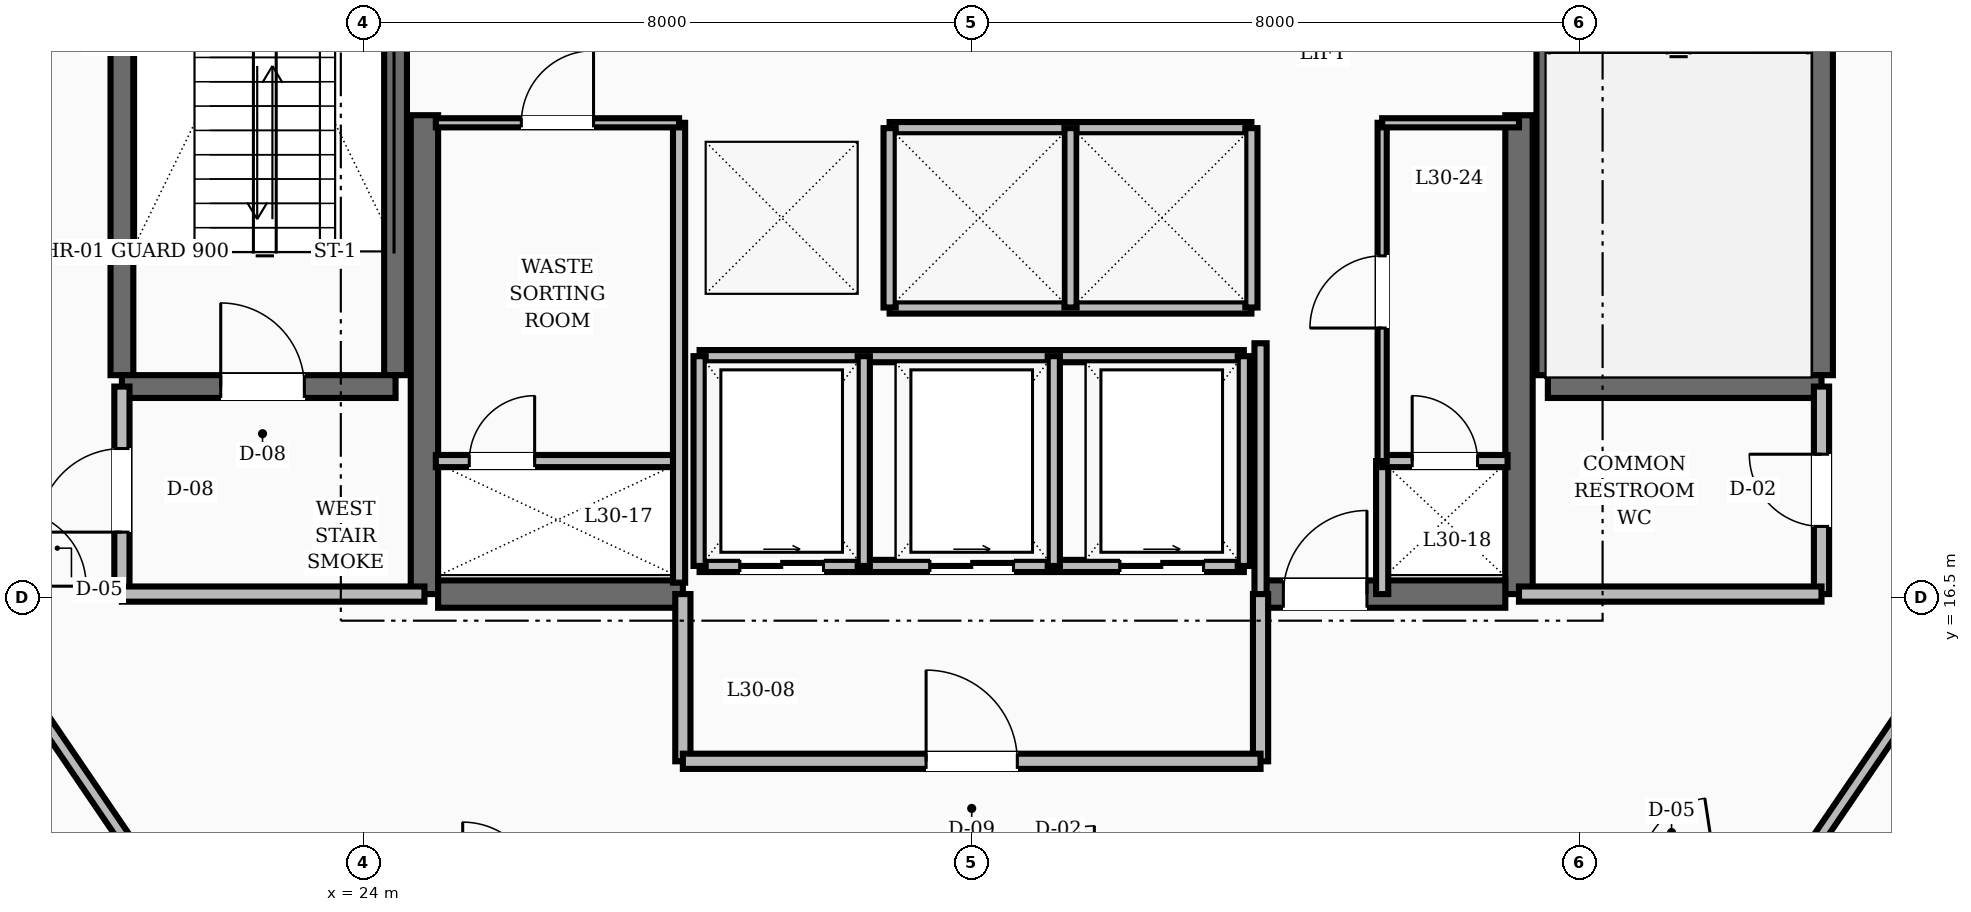
"""IFC4 building model, lengths in metres.
Left out: names, types, materials, properties, quantities, classifications, styles, units other than length and angle.
Written with IfcOpenShell. Run it as: python <this file> out.ifc"""

import sys

from ifc_helpers import new_model, si_unit, direction, frame, frame_2d, origin, place, context, subcontext, project, spatial, rectangle, extrude, element, fill, save


model = new_model("IFC4")
c1 = context("Model", 3, precision=1e-05, world=origin(), true_north=direction((0.0, 1.0)))
c2 = subcontext(c1, "Body", "Model", "MODEL_VIEW")
j1 = project(units=[si_unit("LENGTHUNIT", "METRE"), si_unit("PLANEANGLEUNIT", "RADIAN")], contexts=[c1])
p1 = place(None, origin())
s1 = spatial("IfcSite", under=j1, at=p1, CompositionType="ELEMENT")
p2 = place(p1, origin())
s2 = spatial("IfcBuilding", under=s1, at=p2, CompositionType="ELEMENT")
p3 = place(p2, frame((0.0, 0.0, 120.8)))
s3 = spatial("IfcBuildingStorey", under=s2, at=p3, CompositionType="ELEMENT", Elevation=120.8)
for number, where, z_axis, x_axis in (
    (1, (24.8, 16.55, 0.0), (0.0, 0.0, 1.0), (0.0, 1.0, 0.0)),
    (2, (39.2, 16.55, 0.0), (0.0, 0.0, 1.0), (0.0, 1.0, 0.0)),
):
    element("IfcWall", number, at=place(p3, frame(where, z_axis=z_axis, x_axis=x_axis)), inside=s3, PredefinedType="SHEAR", context=c2, shape_type="SweptSolid", body=[
        extrude(rectangle(XDim=6.3, YDim=0.36, at=frame_2d((3.15, 0.0))), origin(), (0.0, 0.0, 1.0), 3.6),
    ])
p4 = place(p3, frame((24.98, 16.55, 0.0), z_axis=(0.0, 0.0, 1.0), x_axis=(1.0, 0.0, 0.0)))
e3 = element("IfcWall", 3, at=p4, inside=s3, PredefinedType="SHEAR", context=c2, shape_type="SweptSolid", body=[
    extrude(rectangle(XDim=3.22, YDim=0.36, at=frame_2d((1.61, 0.0))), origin(), (0.0, 0.0, 1.0), 3.6),
])
p5 = place(p3, frame((35.8, 16.55, 0.0), z_axis=(0.0, 0.0, 1.0), x_axis=(1.0, 0.0, 0.0)))
e4 = element("IfcWall", 4, at=p5, inside=s3, PredefinedType="SHEAR", context=c2, shape_type="SweptSolid", body=[
    extrude(rectangle(XDim=3.22, YDim=0.36, at=frame_2d((1.61, 0.0))), origin(), (0.0, 0.0, 1.0), 3.6),
])
p6 = place(p5, frame((0.3, 0.0, 0.0)))
e5 = element("IfcOpeningElement", 5, at=p6, cuts=e4, PredefinedType="OPENING", context=c2, shape_type="SweptSolid", body=[
    extrude(rectangle(XDim=1.1, YDim=2.1, at=frame_2d((0.55, 1.05))), frame((0.0, 0.19, 0.0), z_axis=(0.0, -1.0, 0.0), x_axis=(1.0, 0.0, 0.0)), (0.0, 0.0, 1.0), 0.38),
])
for number, where, z_axis, x_axis in (
    (6, (20.82, 19.43, 0.0), (0.0, 0.0, 1.0), (0.0, 1.0, 0.0)),
    (7, (24.42, 19.43, 0.0), (0.0, 0.0, 1.0), (0.0, 1.0, 0.0)),
):
    element("IfcWall", number, at=place(p3, frame(where, z_axis=z_axis, x_axis=x_axis)), inside=s3, PredefinedType="SHEAR", context=c2, shape_type="SweptSolid", body=[
        extrude(rectangle(XDim=8.74, YDim=0.3, at=frame_2d((4.37, 0.0))), origin(), (0.0, 0.0, 1.0), 3.6),
    ])
p7 = place(p3, frame((20.82, 19.28, 0.0), z_axis=(0.0, 0.0, 1.0), x_axis=(1.0, 0.0, 0.0)))
e8 = element("IfcWall", 8, at=p7, inside=s3, PredefinedType="SHEAR", context=c2, shape_type="SweptSolid", body=[
    extrude(rectangle(XDim=3.6, YDim=0.3, at=frame_2d((1.8, 0.0))), origin(), (0.0, 0.0, 1.0), 3.6),
])
p8 = place(p7, frame((1.3, 0.0, 0.0)))
e9 = element("IfcOpeningElement", 9, at=p8, cuts=e8, PredefinedType="OPENING", context=c2, shape_type="SweptSolid", body=[
    extrude(rectangle(XDim=1.1, YDim=2.1, at=frame_2d((0.55, 1.05))), frame((0.0, 0.16, 0.0), z_axis=(0.0, -1.0, 0.0), x_axis=(1.0, 0.0, 0.0)), (0.0, 0.0, 1.0), 0.32),
])
for number, where, z_axis, x_axis in (
    (10, (43.18, 19.43, 0.0), (0.0, 0.0, 1.0), (0.0, 1.0, 0.0)),
    (11, (39.58, 19.43, 0.0), (0.0, 0.0, 1.0), (0.0, 1.0, 0.0)),
):
    element("IfcWall", number, at=place(p3, frame(where, z_axis=z_axis, x_axis=x_axis)), inside=s3, PredefinedType="SHEAR", context=c2, shape_type="SweptSolid", body=[
        extrude(rectangle(XDim=8.74, YDim=0.3, at=frame_2d((4.37, 0.0))), origin(), (0.0, 0.0, 1.0), 3.6),
    ])
p9 = place(p3, frame((39.58, 19.28, 0.0), z_axis=(0.0, 0.0, 1.0), x_axis=(1.0, 0.0, 0.0)))
e12 = element("IfcWall", 12, at=p9, inside=s3, PredefinedType="SHEAR", context=c2, shape_type="SweptSolid", body=[
    extrude(rectangle(XDim=3.6, YDim=0.3, at=frame_2d((1.8, 0.0))), origin(), (0.0, 0.0, 1.0), 3.6),
])
p10 = place(p3, frame((20.82, 16.55, 0.0), z_axis=(0.0, 0.0, 1.0), x_axis=(0.0, 1.0, 0.0)))
e13 = element("IfcWall", 13, at=p10, inside=s3, PredefinedType="SOLIDWALL", context=c2, shape_type="SweptSolid", body=[
    extrude(rectangle(XDim=2.73, YDim=0.2, at=frame_2d((1.365, 0.0))), origin(), (0.0, 0.0, 1.0), 2.8),
])
p11 = place(p10, frame((0.815, 0.0, 0.0)))
e14 = element("IfcOpeningElement", 14, at=p11, cuts=e13, PredefinedType="OPENING", context=c2, shape_type="SweptSolid", body=[
    extrude(rectangle(XDim=1.1, YDim=2.1, at=frame_2d((0.55, 1.05))), frame((0.0, 0.11, 0.0), z_axis=(0.0, -1.0, 0.0), x_axis=(1.0, 0.0, 0.0)), (0.0, 0.0, 1.0), 0.22),
])
p12 = place(p3, frame((20.82, 16.55, 0.0), z_axis=(0.0, 0.0, 1.0), x_axis=(1.0, 0.0, 0.0)))
e15 = element("IfcWall", 15, at=p12, inside=s3, PredefinedType="SOLIDWALL", context=c2, shape_type="SweptSolid", body=[
    extrude(rectangle(XDim=3.98, YDim=0.2, at=frame_2d((1.99, 0.0))), origin(), (0.0, 0.0, 1.0), 2.8),
])
p13 = place(p3, frame((43.18, 16.55, 0.0), z_axis=(0.0, 0.0, 1.0), x_axis=(0.0, 1.0, 0.0)))
e16 = element("IfcWall", 16, at=p13, inside=s3, PredefinedType="SOLIDWALL", context=c2, shape_type="SweptSolid", body=[
    extrude(rectangle(XDim=2.73, YDim=0.2, at=frame_2d((1.365, 0.0))), origin(), (0.0, 0.0, 1.0), 2.8),
])
p14 = place(p13, frame((0.89, 0.0, 0.0)))
e17 = element("IfcOpeningElement", 17, at=p14, cuts=e16, PredefinedType="OPENING", context=c2, shape_type="SweptSolid", body=[
    extrude(rectangle(XDim=0.95, YDim=2.1, at=frame_2d((0.475, 1.05))), frame((0.0, 0.11, 0.0), z_axis=(0.0, -1.0, 0.0), x_axis=(1.0, 0.0, 0.0)), (0.0, 0.0, 1.0), 0.22),
])
p15 = place(p3, frame((39.2, 16.55, 0.0), z_axis=(0.0, 0.0, 1.0), x_axis=(1.0, 0.0, 0.0)))
e18 = element("IfcWall", 18, at=p15, inside=s3, PredefinedType="SOLIDWALL", context=c2, shape_type="SweptSolid", body=[
    extrude(rectangle(XDim=3.98, YDim=0.2, at=frame_2d((1.99, 0.0))), origin(), (0.0, 0.0, 1.0), 2.8),
])
p16 = place(p3, frame((35.8, 16.55, 0.0), z_axis=(0.0, 0.0, 1.0), x_axis=(0.0, 1.0, 0.0)))
e19 = element("IfcWall", 19, at=p16, inside=s3, PredefinedType="SOLIDWALL", context=c2, shape_type="SweptSolid", body=[
    extrude(rectangle(XDim=3.3, YDim=0.16, at=frame_2d((1.65, 0.0))), origin(), (0.0, 0.0, 1.0), 2.8),
])
p17 = place(p3, frame((37.4, 16.55, 0.0), z_axis=(0.0, 0.0, 1.0), x_axis=(0.0, 1.0, 0.0)))
e20 = element("IfcWall", 20, at=p17, inside=s3, PredefinedType="SOLIDWALL", context=c2, shape_type="SweptSolid", body=[
    extrude(rectangle(XDim=1.75, YDim=0.16, at=frame_2d((0.875, 0.0))), origin(), (0.0, 0.0, 1.0), 2.8),
])
for number, where, z_axis, x_axis in (
    (21, (28.2, 14.35, 0.0), (0.0, 0.0, 1.0), (0.0, 1.0, 0.0)),
    (22, (35.8, 14.35, 0.0), (0.0, 0.0, 1.0), (0.0, 1.0, 0.0)),
):
    element("IfcWall", number, at=place(p3, frame(where, z_axis=z_axis, x_axis=x_axis)), inside=s3, PredefinedType="SOLIDWALL", context=c2, shape_type="SweptSolid", body=[
        extrude(rectangle(XDim=2.2, YDim=0.2, at=frame_2d((1.1, 0.0))), origin(), (0.0, 0.0, 1.0), 2.8),
    ])
p18 = place(p3, frame((28.2, 14.35, 0.0), z_axis=(0.0, 0.0, 1.0), x_axis=(1.0, 0.0, 0.0)))
e23 = element("IfcWall", 23, at=p18, inside=s3, PredefinedType="SOLIDWALL", context=c2, shape_type="SweptSolid", body=[
    extrude(rectangle(XDim=7.6, YDim=0.2, at=frame_2d((3.8, 0.0))), origin(), (0.0, 0.0, 1.0), 2.8),
])
p19 = place(p18, frame((3.2, 0.0, 0.0)))
e24 = element("IfcOpeningElement", 24, at=p19, cuts=e23, PredefinedType="OPENING", context=c2, shape_type="SweptSolid", body=[
    extrude(rectangle(XDim=1.2, YDim=2.1, at=frame_2d((0.6, 1.05))), frame((0.0, 0.11, 0.0), z_axis=(0.0, -1.0, 0.0), x_axis=(1.0, 0.0, 0.0)), (0.0, 0.0, 1.0), 0.22),
])
for number, where, z_axis, x_axis in (
    (25, (30.92, 22.68, 0.0), (0.0, 0.0, 1.0), (1.0, 0.0, 0.0)),
    (26, (30.92, 20.32, 0.0), (0.0, 0.0, 1.0), (1.0, 0.0, 0.0)),
):
    element("IfcWall", number, at=place(p3, frame(where, z_axis=z_axis, x_axis=x_axis)), inside=s3, PredefinedType="SOLIDWALL", context=c2, shape_type="SweptSolid", body=[
        extrude(rectangle(XDim=4.76, YDim=0.16, at=frame_2d((2.38, 0.0))), origin(), (0.0, 0.0, 1.0), 2.8),
    ])
for number, where, z_axis, x_axis in (
    (27, (30.92, 20.32, 0.0), (0.0, 0.0, 1.0), (0.0, 1.0, 0.0)),
    (28, (33.3, 20.32, 0.0), (0.0, 0.0, 1.0), (0.0, 1.0, 0.0)),
    (29, (35.68, 20.32, 0.0), (0.0, 0.0, 1.0), (0.0, 1.0, 0.0)),
):
    element("IfcWall", number, at=place(p3, frame(where, z_axis=z_axis, x_axis=x_axis)), inside=s3, PredefinedType="SOLIDWALL", context=c2, shape_type="SweptSolid", body=[
        extrude(rectangle(XDim=2.36, YDim=0.16, at=frame_2d((1.18, 0.0))), origin(), (0.0, 0.0, 1.0), 2.8),
    ])
p20 = place(p3, frame((28.42, 16.92, 0.0), z_axis=(0.0, 0.0, 1.0), x_axis=(1.0, 0.0, 0.0)))
e30 = element("IfcWall", 30, at=p20, inside=s3, PredefinedType="SOLIDWALL", context=c2, shape_type="SweptSolid", body=[
    extrude(rectangle(XDim=7.16, YDim=0.16, at=frame_2d((3.58, 0.0))), origin(), (0.0, 0.0, 1.0), 2.8),
])
p21 = place(p20, frame((0.53, 0.0, 0.0)))
e31 = element("IfcOpeningElement", 31, at=p21, cuts=e30, PredefinedType="OPENING", context=c2, shape_type="SweptSolid", body=[
    extrude(rectangle(XDim=1.1, YDim=2.15, at=frame_2d((0.55, 1.075))), frame((0.0, 0.09, 0.0), z_axis=(0.0, -1.0, 0.0), x_axis=(1.0, 0.0, 0.0)), (0.0, 0.0, 1.0), 0.18),
])
p22 = place(p20, frame((3.03, 0.0, 0.0)))
e32 = element("IfcOpeningElement", 32, at=p22, cuts=e30, PredefinedType="OPENING", context=c2, shape_type="SweptSolid", body=[
    extrude(rectangle(XDim=1.1, YDim=2.15, at=frame_2d((0.55, 1.075))), frame((0.0, 0.09, 0.0), z_axis=(0.0, -1.0, 0.0), x_axis=(1.0, 0.0, 0.0)), (0.0, 0.0, 1.0), 0.18),
])
p23 = place(p20, frame((5.53, 0.0, 0.0)))
e33 = element("IfcOpeningElement", 33, at=p23, cuts=e30, PredefinedType="OPENING", context=c2, shape_type="SweptSolid", body=[
    extrude(rectangle(XDim=1.1, YDim=2.15, at=frame_2d((0.55, 1.075))), frame((0.0, 0.09, 0.0), z_axis=(0.0, -1.0, 0.0), x_axis=(1.0, 0.0, 0.0)), (0.0, 0.0, 1.0), 0.18),
])
p24 = place(p3, frame((28.42, 19.68, 0.0), z_axis=(0.0, 0.0, 1.0), x_axis=(1.0, 0.0, 0.0)))
e34 = element("IfcWall", 34, at=p24, inside=s3, PredefinedType="SOLIDWALL", context=c2, shape_type="SweptSolid", body=[
    extrude(rectangle(XDim=7.16, YDim=0.16, at=frame_2d((3.58, 0.0))), origin(), (0.0, 0.0, 1.0), 2.8),
])
for number, where, z_axis, x_axis in (
    (35, (28.42, 16.92, 0.0), (0.0, 0.0, 1.0), (0.0, 1.0, 0.0)),
    (36, (30.58, 16.92, 0.0), (0.0, 0.0, 1.0), (0.0, 1.0, 0.0)),
    (37, (33.08, 16.92, 0.0), (0.0, 0.0, 1.0), (0.0, 1.0, 0.0)),
    (38, (35.58, 16.92, 0.0), (0.0, 0.0, 1.0), (0.0, 1.0, 0.0)),
):
    element("IfcWall", number, at=place(p3, frame(where, z_axis=z_axis, x_axis=x_axis)), inside=s3, PredefinedType="SOLIDWALL", context=c2, shape_type="SweptSolid", body=[
        extrude(rectangle(XDim=2.76, YDim=0.16, at=frame_2d((1.38, 0.0))), origin(), (0.0, 0.0, 1.0), 2.8),
    ])
p25 = place(p3, frame((24.95, 18.3, 0.0), z_axis=(0.0, 0.0, 1.0), x_axis=(1.0, 0.0, 0.0)))
e39 = element("IfcWall", 39, at=p25, inside=s3, PredefinedType="SOLIDWALL", context=c2, shape_type="SweptSolid", body=[
    extrude(rectangle(XDim=3.2, YDim=0.16, at=frame_2d((1.6, 0.0))), origin(), (0.0, 0.0, 1.0), 2.8),
])
p26 = place(p25, frame((0.44, 0.0, 0.0)))
e40 = element("IfcOpeningElement", 40, at=p26, cuts=e39, PredefinedType="OPENING", context=c2, shape_type="SweptSolid", body=[
    extrude(rectangle(XDim=0.86, YDim=2.05, at=frame_2d((0.43, 1.025))), frame((0.0, 0.09, 0.0), z_axis=(0.0, -1.0, 0.0), x_axis=(1.0, 0.0, 0.0)), (0.0, 0.0, 1.0), 0.18),
])
p27 = place(p3, frame((28.15, 16.7, 0.0), z_axis=(0.0, 0.0, 1.0), x_axis=(0.0, 1.0, 0.0)))
e41 = element("IfcWall", 41, at=p27, inside=s3, PredefinedType="SOLIDWALL", context=c2, shape_type="SweptSolid", body=[
    extrude(rectangle(XDim=6.05, YDim=0.16, at=frame_2d((3.025, 0.0))), origin(), (0.0, 0.0, 1.0), 2.8),
])
p28 = place(p3, frame((37.4, 18.3, 0.0), z_axis=(0.0, 0.0, 1.0), x_axis=(1.0, 0.0, 0.0)))
e42 = element("IfcWall", 42, at=p28, inside=s3, PredefinedType="SOLIDWALL", context=c2, shape_type="SweptSolid", body=[
    extrude(rectangle(XDim=1.65, YDim=0.16, at=frame_2d((0.825, 0.0))), origin(), (0.0, 0.0, 1.0), 2.8),
])
p29 = place(p28, frame((0.395, 0.0, 0.0)))
e43 = element("IfcOpeningElement", 43, at=p29, cuts=e42, PredefinedType="OPENING", context=c2, shape_type="SweptSolid", body=[
    extrude(rectangle(XDim=0.86, YDim=2.1, at=frame_2d((0.43, 1.05))), frame((0.0, 0.09, 0.0), z_axis=(0.0, -1.0, 0.0), x_axis=(1.0, 0.0, 0.0)), (0.0, 0.0, 1.0), 0.18),
])
p30 = place(p3, frame((24.95, 22.75, 0.0), z_axis=(0.0, 0.0, 1.0), x_axis=(1.0, 0.0, 0.0)))
e44 = element("IfcWall", 44, at=p30, inside=s3, PredefinedType="PARTITIONING", context=c2, shape_type="SweptSolid", body=[
    extrude(rectangle(XDim=3.2, YDim=0.12, at=frame_2d((1.6, 0.0))), origin(), (0.0, 0.0, 1.0), 2.8),
])
p31 = place(p30, frame((1.125, 0.0, 0.0)))
e45 = element("IfcOpeningElement", 45, at=p31, cuts=e44, PredefinedType="OPENING", context=c2, shape_type="SweptSolid", body=[
    extrude(rectangle(XDim=0.95, YDim=2.1, at=frame_2d((0.475, 1.05))), frame((0.0, 0.07, 0.0), z_axis=(0.0, -1.0, 0.0), x_axis=(1.0, 0.0, 0.0)), (0.0, 0.0, 1.0), 0.14),
])
p32 = place(p3, frame((37.4, 18.3, 0.0), z_axis=(0.0, 0.0, 1.0), x_axis=(0.0, 1.0, 0.0)))
e46 = element("IfcWall", 46, at=p32, inside=s3, PredefinedType="PARTITIONING", context=c2, shape_type="SweptSolid", body=[
    extrude(rectangle(XDim=4.45, YDim=0.12, at=frame_2d((2.225, 0.0))), origin(), (0.0, 0.0, 1.0), 2.8),
])
p33 = place(p32, frame((1.75, 0.0, 0.0)))
e47 = element("IfcOpeningElement", 47, at=p33, cuts=e46, PredefinedType="OPENING", context=c2, shape_type="SweptSolid", body=[
    extrude(rectangle(XDim=0.95, YDim=2.1, at=frame_2d((0.475, 1.05))), frame((0.0, 0.07, 0.0), z_axis=(0.0, -1.0, 0.0), x_axis=(1.0, 0.0, 0.0)), (0.0, 0.0, 1.0), 0.14),
])
p34 = place(p3, frame((37.4, 22.75, 0.0), z_axis=(0.0, 0.0, 1.0), x_axis=(1.0, 0.0, 0.0)))
e48 = element("IfcWall", 48, at=p34, inside=s3, PredefinedType="PARTITIONING", context=c2, shape_type="SweptSolid", body=[
    extrude(rectangle(XDim=1.8, YDim=0.12, at=frame_2d((0.9, 0.0))), origin(), (0.0, 0.0, 1.0), 2.8),
])
for number, where, z_axis, x_axis in (
    (49, (19.35, 15.548, 0.0), (0.0, 0.0, 1.0), (0.563, -0.827, 0.0)),
    (50, (42.95, 13.05, 0.0), (0.0, 0.0, 1.0), (0.563, 0.827, 0.0)),
):
    element("IfcWall", number, at=place(p3, frame(where, z_axis=z_axis, x_axis=x_axis)), inside=s3, PredefinedType="SOLIDWALL", context=c2, shape_type="SweptSolid", body=[
        extrude(rectangle(XDim=3.021, YDim=0.16, at=frame_2d((1.511, 0.0))), origin(), (0.0, 0.0, 1.0), 2.8),
    ])
p35 = place(p8, origin())
e51 = element("IfcDoor", 51, at=p35, inside=s3, OperationType="SINGLE_SWING_LEFT", PredefinedType="DOOR", context=c2, shape_type="SweptSolid", body=[
    extrude(rectangle(XDim=1.1, YDim=2.1, at=frame_2d((0.55, 1.05))), frame((0.0, 0.025, 0.0), z_axis=(0.0, -1.0, 0.0), x_axis=(1.0, 0.0, 0.0)), (0.0, 0.0, 1.0), 0.05),
])
fill(e9, e51)
p36 = place(p11, origin())
e52 = element("IfcDoor", 52, at=p36, inside=s3, OperationType="SINGLE_SWING_LEFT", PredefinedType="DOOR", context=c2, shape_type="SweptSolid", body=[
    extrude(rectangle(XDim=1.1, YDim=2.1, at=frame_2d((0.55, 1.05))), frame((0.0, 0.025, 0.0), z_axis=(0.0, -1.0, 0.0), x_axis=(1.0, 0.0, 0.0)), (0.0, 0.0, 1.0), 0.05),
])
fill(e14, e52)
p37 = place(p14, origin())
e53 = element("IfcDoor", 53, at=p37, inside=s3, OperationType="SINGLE_SWING_RIGHT", PredefinedType="DOOR", context=c2, shape_type="SweptSolid", body=[
    extrude(rectangle(XDim=0.95, YDim=2.1, at=frame_2d((0.475, 1.05))), frame((0.0, 0.025, 0.0), z_axis=(0.0, -1.0, 0.0), x_axis=(1.0, 0.0, 0.0)), (0.0, 0.0, 1.0), 0.05),
])
fill(e17, e53)
p38 = place(p6, origin())
e54 = element("IfcDoor", 54, at=p38, inside=s3, OperationType="SINGLE_SWING_RIGHT", PredefinedType="DOOR", context=c2, shape_type="SweptSolid", body=[
    extrude(rectangle(XDim=1.1, YDim=2.1, at=frame_2d((0.55, 1.05))), frame((0.0, 0.025, 0.0), z_axis=(0.0, -1.0, 0.0), x_axis=(1.0, 0.0, 0.0)), (0.0, 0.0, 1.0), 0.05),
])
fill(e5, e54)
p39 = place(p19, origin())
e55 = element("IfcDoor", 55, at=p39, inside=s3, OperationType="SINGLE_SWING_LEFT", PredefinedType="DOOR", context=c2, shape_type="SweptSolid", body=[
    extrude(rectangle(XDim=1.2, YDim=2.1, at=frame_2d((0.6, 1.05))), frame((0.0, 0.025, 0.0), z_axis=(0.0, -1.0, 0.0), x_axis=(1.0, 0.0, 0.0)), (0.0, 0.0, 1.0), 0.05),
])
fill(e24, e55)
p40 = place(p21, origin())
e56 = element("IfcDoor", 56, at=p40, inside=s3, OperationType="SLIDING_TO_RIGHT", PredefinedType="DOOR", context=c2, shape_type="SweptSolid", body=[
    extrude(rectangle(XDim=1.1, YDim=2.15, at=frame_2d((0.55, 1.075))), frame((0.0, 0.025, 0.0), z_axis=(0.0, -1.0, 0.0), x_axis=(1.0, 0.0, 0.0)), (0.0, 0.0, 1.0), 0.05),
])
fill(e31, e56)
p41 = place(p22, origin())
e57 = element("IfcDoor", 57, at=p41, inside=s3, OperationType="SLIDING_TO_RIGHT", PredefinedType="DOOR", context=c2, shape_type="SweptSolid", body=[
    extrude(rectangle(XDim=1.1, YDim=2.15, at=frame_2d((0.55, 1.075))), frame((0.0, 0.025, 0.0), z_axis=(0.0, -1.0, 0.0), x_axis=(1.0, 0.0, 0.0)), (0.0, 0.0, 1.0), 0.05),
])
fill(e32, e57)
p42 = place(p23, origin())
e58 = element("IfcDoor", 58, at=p42, inside=s3, OperationType="SLIDING_TO_RIGHT", PredefinedType="DOOR", context=c2, shape_type="SweptSolid", body=[
    extrude(rectangle(XDim=1.1, YDim=2.15, at=frame_2d((0.55, 1.075))), frame((0.0, 0.025, 0.0), z_axis=(0.0, -1.0, 0.0), x_axis=(1.0, 0.0, 0.0)), (0.0, 0.0, 1.0), 0.05),
])
fill(e33, e58)
p43 = place(p26, origin())
e59 = element("IfcDoor", 59, at=p43, inside=s3, OperationType="SINGLE_SWING_RIGHT", PredefinedType="TRAPDOOR", context=c2, shape_type="SweptSolid", body=[
    extrude(rectangle(XDim=0.86, YDim=2.05, at=frame_2d((0.43, 1.025))), frame((0.0, 0.025, 0.0), z_axis=(0.0, -1.0, 0.0), x_axis=(1.0, 0.0, 0.0)), (0.0, 0.0, 1.0), 0.05),
])
fill(e40, e59)
p44 = place(p29, origin())
e60 = element("IfcDoor", 60, at=p44, inside=s3, OperationType="SINGLE_SWING_LEFT", PredefinedType="TRAPDOOR", context=c2, shape_type="SweptSolid", body=[
    extrude(rectangle(XDim=0.86, YDim=2.1, at=frame_2d((0.43, 1.05))), frame((0.0, 0.025, 0.0), z_axis=(0.0, -1.0, 0.0), x_axis=(1.0, 0.0, 0.0)), (0.0, 0.0, 1.0), 0.05),
])
fill(e43, e60)
p45 = place(p31, origin())
e61 = element("IfcDoor", 61, at=p45, inside=s3, OperationType="SINGLE_SWING_RIGHT", PredefinedType="DOOR", context=c2, shape_type="SweptSolid", body=[
    extrude(rectangle(XDim=0.95, YDim=2.1, at=frame_2d((0.475, 1.05))), frame((0.0, 0.025, 0.0), z_axis=(0.0, -1.0, 0.0), x_axis=(1.0, 0.0, 0.0)), (0.0, 0.0, 1.0), 0.05),
])
fill(e45, e61)
p46 = place(p33, origin())
e62 = element("IfcDoor", 62, at=p46, inside=s3, OperationType="SINGLE_SWING_LEFT", PredefinedType="DOOR", context=c2, shape_type="SweptSolid", body=[
    extrude(rectangle(XDim=0.95, YDim=2.1, at=frame_2d((0.475, 1.05))), frame((0.0, 0.025, 0.0), z_axis=(0.0, -1.0, 0.0), x_axis=(1.0, 0.0, 0.0)), (0.0, 0.0, 1.0), 0.05),
])
fill(e47, e62)
save(model, sys.argv[1])
